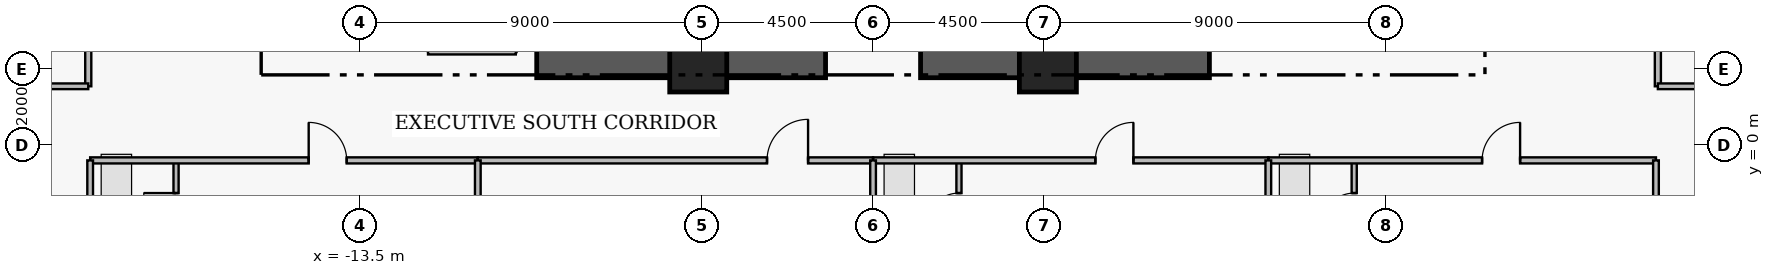
"""IFC4 building model, lengths in metres.
Left out: names, types, materials, properties, quantities, classifications, styles, units other than length and angle.
Written with IfcOpenShell. Run it as: python <this file> out.ifc"""

import sys

from ifc_helpers import new_model, si_unit, direction, frame, frame_2d, origin, origin_2d, place, context, subcontext, project, spatial, rectangle, extrude, element, fill, save


model = new_model("IFC4")
c1 = context("Model", 3, precision=1e-05, world=origin(), true_north=direction((0.0, 1.0)))
c2 = subcontext(c1, "Body", "Model", "MODEL_VIEW")
j1 = project(units=[si_unit("LENGTHUNIT", "METRE"), si_unit("PLANEANGLEUNIT", "RADIAN")], contexts=[c1])
p1 = place(None, origin())
s1 = spatial("IfcSite", under=j1, at=p1, CompositionType="ELEMENT")
p2 = place(p1, origin())
s2 = spatial("IfcBuilding", under=s1, at=p2, CompositionType="ELEMENT")
p3 = place(p2, frame((0.0, 0.0, 132.15)))
s3 = spatial("IfcBuildingStorey", under=s2, at=p3, CompositionType="ELEMENT", Elevation=132.15)
for number, where, z_axis, x_axis in (
    (1, (-8.85, 2.15, 0.0), (0.0, 0.0, 1.0), (1.0, 0.0, 0.0)),
    (2, (1.25, 2.15, 0.0), (0.0, 0.0, 1.0), (1.0, 0.0, 0.0)),
):
    element("IfcWall", number, at=place(p3, frame(where, z_axis=z_axis, x_axis=x_axis)), inside=s3, PredefinedType="SHEAR", context=c2, shape_type="SweptSolid", body=[
        extrude(rectangle(XDim=7.6, YDim=0.75, at=frame_2d((3.8, 0.0))), origin(), (0.0, 0.0, 1.0), 3.43),
    ])
for number, where, z_axis, x_axis in (
    (3, (-4.6, 2.15, 0.0), (0.0, 0.0, 1.0), (1.0, 0.0, 0.0)),
    (4, (4.6, 2.15, 0.0), (0.0, 0.0, 1.0), (1.0, 0.0, 0.0)),
):
    element("IfcColumn", number, at=place(p3, frame(where, z_axis=z_axis, x_axis=x_axis)), inside=s3, PredefinedType="COLUMN", context=c2, shape_type="SweptSolid", body=[
        extrude(rectangle(XDim=1.5, YDim=1.5, at=origin_2d()), origin(), (0.0, 0.0, 1.0), 3.65),
    ])
p4 = place(p3, frame((-18.34, -2.76, 0.0), z_axis=(0.0, 0.0, 1.0), x_axis=(0.0, 1.0, 0.0)))
e5 = element("IfcWall", 5, at=p4, inside=s3, PredefinedType="PLUMBINGWALL", context=c2, shape_type="SweptSolid", body=[
    extrude(rectangle(XDim=2.36, YDim=0.135, at=frame_2d((1.18, 0.0))), origin(), (0.0, 0.0, 1.0), 3.43),
])
p5 = place(p4, frame((0.65, 0.0, 0.0)))
e6 = element("IfcOpeningElement", 6, at=p5, cuts=e5, PredefinedType="OPENING", context=c2, shape_type="SweptSolid", body=[
    extrude(rectangle(XDim=0.85, YDim=2.1, at=frame_2d((0.425, 1.05))), frame((0.0, 0.077, 0.0), z_axis=(0.0, -1.0, 0.0), x_axis=(1.0, 0.0, 0.0)), (0.0, 0.0, 1.0), 0.155),
])
p6 = place(p3, frame((-20.6, -0.4, 0.0), z_axis=(0.0, 0.0, 1.0), x_axis=(1.0, 0.0, 0.0)))
e7 = element("IfcWall", 7, at=p6, inside=s3, PredefinedType="PARTITIONING", context=c2, shape_type="SweptSolid", body=[
    extrude(rectangle(XDim=10.2, YDim=0.16, at=frame_2d((5.1, 0.0))), origin(), (0.0, 0.0, 1.0), 3.43),
])
p7 = place(p6, frame((5.75, 0.0, 0.0)))
e8 = element("IfcOpeningElement", 8, at=p7, cuts=e7, PredefinedType="OPENING", context=c2, shape_type="SweptSolid", body=[
    extrude(rectangle(XDim=1.0, YDim=2.15, at=frame_2d((0.5, 1.075))), frame((0.0, 0.09, 0.0), z_axis=(0.0, -1.0, 0.0), x_axis=(1.0, 0.0, 0.0)), (0.0, 0.0, 1.0), 0.18),
])
p8 = place(p3, frame((-10.4, -0.4, 0.0), z_axis=(0.0, 0.0, 1.0), x_axis=(1.0, 0.0, 0.0)))
e9 = element("IfcWall", 9, at=p8, inside=s3, PredefinedType="PARTITIONING", context=c2, shape_type="SweptSolid", body=[
    extrude(rectangle(XDim=10.4, YDim=0.16, at=frame_2d((5.2, 0.0))), origin(), (0.0, 0.0, 1.0), 3.43),
])
p9 = place(p8, frame((7.61, 0.0, 0.0)))
e10 = element("IfcOpeningElement", 10, at=p9, cuts=e9, PredefinedType="OPENING", context=c2, shape_type="SweptSolid", body=[
    extrude(rectangle(XDim=1.08, YDim=2.18, at=frame_2d((0.54, 1.09))), frame((0.0, 0.09, 0.0), z_axis=(0.0, -1.0, 0.0), x_axis=(1.0, 0.0, 0.0)), (0.0, 0.0, 1.0), 0.18),
])
p10 = place(p3, frame((2.26, -2.76, 0.0), z_axis=(0.0, 0.0, 1.0), x_axis=(0.0, 1.0, 0.0)))
e11 = element("IfcWall", 11, at=p10, inside=s3, PredefinedType="PLUMBINGWALL", context=c2, shape_type="SweptSolid", body=[
    extrude(rectangle(XDim=2.36, YDim=0.135, at=frame_2d((1.18, 0.0))), origin(), (0.0, 0.0, 1.0), 3.43),
])
p11 = place(p10, frame((0.65, 0.0, 0.0)))
e12 = element("IfcOpeningElement", 12, at=p11, cuts=e11, PredefinedType="OPENING", context=c2, shape_type="SweptSolid", body=[
    extrude(rectangle(XDim=0.85, YDim=2.1, at=frame_2d((0.425, 1.05))), frame((0.0, 0.077, 0.0), z_axis=(0.0, -1.0, 0.0), x_axis=(1.0, 0.0, 0.0)), (0.0, 0.0, 1.0), 0.155),
])
p12 = place(p3, frame((0.0, -0.4, 0.0), z_axis=(0.0, 0.0, 1.0), x_axis=(1.0, 0.0, 0.0)))
e13 = element("IfcWall", 13, at=p12, inside=s3, PredefinedType="PARTITIONING", context=c2, shape_type="SweptSolid", body=[
    extrude(rectangle(XDim=10.4, YDim=0.16, at=frame_2d((5.2, 0.0))), origin(), (0.0, 0.0, 1.0), 3.43),
])
p13 = place(p12, frame((5.85, 0.0, 0.0)))
e14 = element("IfcOpeningElement", 14, at=p13, cuts=e13, PredefinedType="OPENING", context=c2, shape_type="SweptSolid", body=[
    extrude(rectangle(XDim=1.0, YDim=2.15, at=frame_2d((0.5, 1.075))), frame((0.0, 0.09, 0.0), z_axis=(0.0, -1.0, 0.0), x_axis=(1.0, 0.0, 0.0)), (0.0, 0.0, 1.0), 0.18),
])
p14 = place(p3, frame((12.66, -2.76, 0.0), z_axis=(0.0, 0.0, 1.0), x_axis=(0.0, 1.0, 0.0)))
e15 = element("IfcWall", 15, at=p14, inside=s3, PredefinedType="PLUMBINGWALL", context=c2, shape_type="SweptSolid", body=[
    extrude(rectangle(XDim=2.36, YDim=0.135, at=frame_2d((1.18, 0.0))), origin(), (0.0, 0.0, 1.0), 3.43),
])
p15 = place(p14, frame((0.65, 0.0, 0.0)))
e16 = element("IfcOpeningElement", 16, at=p15, cuts=e15, PredefinedType="OPENING", context=c2, shape_type="SweptSolid", body=[
    extrude(rectangle(XDim=0.85, YDim=2.1, at=frame_2d((0.425, 1.05))), frame((0.0, 0.077, 0.0), z_axis=(0.0, -1.0, 0.0), x_axis=(1.0, 0.0, 0.0)), (0.0, 0.0, 1.0), 0.155),
])
p16 = place(p3, frame((10.4, -0.4, 0.0), z_axis=(0.0, 0.0, 1.0), x_axis=(1.0, 0.0, 0.0)))
e17 = element("IfcWall", 17, at=p16, inside=s3, PredefinedType="PARTITIONING", context=c2, shape_type="SweptSolid", body=[
    extrude(rectangle(XDim=10.2, YDim=0.16, at=frame_2d((5.1, 0.0))), origin(), (0.0, 0.0, 1.0), 3.43),
])
p17 = place(p16, frame((5.625, 0.0, 0.0)))
e18 = element("IfcOpeningElement", 18, at=p17, cuts=e17, PredefinedType="OPENING", context=c2, shape_type="SweptSolid", body=[
    extrude(rectangle(XDim=1.0, YDim=2.15, at=frame_2d((0.5, 1.075))), frame((0.0, 0.09, 0.0), z_axis=(0.0, -1.0, 0.0), x_axis=(1.0, 0.0, 0.0)), (0.0, 0.0, 1.0), 0.18),
])
p18 = place(p3, frame((20.65, 1.55, 0.0), z_axis=(0.0, 0.0, 1.0), x_axis=(0.0, 1.0, 0.0)))
e19 = element("IfcWall", 19, at=p18, inside=s3, PredefinedType="PARTITIONING", context=c2, shape_type="SweptSolid", body=[
    extrude(rectangle(XDim=6.25, YDim=0.16, at=frame_2d((3.125, 0.0))), origin(), (0.0, 0.0, 1.0), 3.43),
])
p19 = place(p18, frame((2.665, 0.0, 0.0)))
e20 = element("IfcOpeningElement", 20, at=p19, cuts=e19, PredefinedType="OPENING", context=c2, shape_type="SweptSolid", body=[
    extrude(rectangle(XDim=0.92, YDim=2.12, at=frame_2d((0.46, 1.06))), frame((0.0, 0.09, 0.0), z_axis=(0.0, -1.0, 0.0), x_axis=(1.0, 0.0, 0.0)), (0.0, 0.0, 1.0), 0.18),
])
p20 = place(p3, frame((-20.65, 1.55, 0.0), z_axis=(0.0, 0.0, 1.0), x_axis=(0.0, 1.0, 0.0)))
e21 = element("IfcWall", 21, at=p20, inside=s3, PredefinedType="PARTITIONING", context=c2, shape_type="SweptSolid", body=[
    extrude(rectangle(XDim=13.3, YDim=0.16, at=frame_2d((6.65, 0.0))), origin(), (0.0, 0.0, 1.0), 3.43),
])
p21 = place(p20, frame((6.175, 0.0, 0.0)))
e22 = element("IfcOpeningElement", 22, at=p21, cuts=e21, PredefinedType="OPENING", context=c2, shape_type="SweptSolid", body=[
    extrude(rectangle(XDim=0.95, YDim=2.15, at=frame_2d((0.475, 1.075))), frame((0.0, 0.09, 0.0), z_axis=(0.0, -1.0, 0.0), x_axis=(1.0, 0.0, 0.0)), (0.0, 0.0, 1.0), 0.18),
])
p22 = place(p3, frame((-11.71, 2.47, 0.0), z_axis=(0.0, 0.0, 1.0), x_axis=(1.0, 0.0, 0.0)))
e23 = element("IfcWall", 23, at=p22, inside=s3, PredefinedType="PARTITIONING", context=c2, shape_type="SweptSolid", body=[
    extrude(rectangle(XDim=2.31, YDim=0.165, at=frame_2d((1.155, 0.0))), origin(), (0.0, 0.0, 1.0), 2.03),
])
p23 = place(p3, frame((-20.6, -11.9, 0.0), z_axis=(0.0, 0.0, 1.0), x_axis=(0.0, 1.0, 0.0)))
e24 = element("IfcWall", 24, at=p23, inside=s3, PredefinedType="PARTITIONING", context=c2, shape_type="SweptSolid", body=[
    extrude(rectangle(XDim=11.5, YDim=0.15, at=frame_2d((5.75, 0.0))), origin(), (0.0, 0.0, 1.0), 3.43),
])
p24 = place(p3, frame((-10.4, -15.32, 0.0), z_axis=(0.0, 0.0, 1.0), x_axis=(0.0, 1.0, 0.0)))
e25 = element("IfcWall", 25, at=p24, inside=s3, PredefinedType="PARTITIONING", context=c2, shape_type="SweptSolid", body=[
    extrude(rectangle(XDim=14.92, YDim=0.15, at=frame_2d((7.46, 0.0))), origin(), (0.0, 0.0, 1.0), 3.43),
])
p25 = place(p3, frame((0.0, -15.34, 0.0), z_axis=(0.0, 0.0, 1.0), x_axis=(0.0, 1.0, 0.0)))
e26 = element("IfcWall", 26, at=p25, inside=s3, PredefinedType="PARTITIONING", context=c2, shape_type="SweptSolid", body=[
    extrude(rectangle(XDim=14.94, YDim=0.15, at=frame_2d((7.47, 0.0))), origin(), (0.0, 0.0, 1.0), 3.43),
])
p26 = place(p3, frame((10.4, -15.32, 0.0), z_axis=(0.0, 0.0, 1.0), x_axis=(0.0, 1.0, 0.0)))
e27 = element("IfcWall", 27, at=p26, inside=s3, PredefinedType="PARTITIONING", context=c2, shape_type="SweptSolid", body=[
    extrude(rectangle(XDim=14.92, YDim=0.15, at=frame_2d((7.46, 0.0))), origin(), (0.0, 0.0, 1.0), 3.43),
])
p27 = place(p3, frame((20.6, -11.9, 0.0), z_axis=(0.0, 0.0, 1.0), x_axis=(0.0, 1.0, 0.0)))
e28 = element("IfcWall", 28, at=p27, inside=s3, PredefinedType="PARTITIONING", context=c2, shape_type="SweptSolid", body=[
    extrude(rectangle(XDim=11.5, YDim=0.15, at=frame_2d((5.75, 0.0))), origin(), (0.0, 0.0, 1.0), 3.43),
])
for number, where, z_axis, x_axis in (
    (29, (20.65, 1.55, 0.0), (0.0, 0.0, 1.0), (1.0, 0.0, 0.0)),
    (30, (-23.867, 1.55, 0.0), (0.0, 0.0, 1.0), (1.0, 0.0, 0.0)),
):
    element("IfcWall", number, at=place(p3, frame(where, z_axis=z_axis, x_axis=x_axis)), inside=s3, PredefinedType="PARTITIONING", context=c2, shape_type="SweptSolid", body=[
        extrude(rectangle(XDim=3.217, YDim=0.15, at=frame_2d((1.608, 0.0))), origin(), (0.0, 0.0, 1.0), 3.43),
    ])
p28 = place(p5, origin())
e31 = element("IfcDoor", 31, at=p28, inside=s3, OperationType="SINGLE_SWING_RIGHT", PredefinedType="DOOR", context=c2, shape_type="SweptSolid", body=[
    extrude(rectangle(XDim=0.85, YDim=2.1, at=frame_2d((0.425, 1.05))), frame((0.0, 0.025, 0.0), z_axis=(0.0, -1.0, 0.0), x_axis=(1.0, 0.0, 0.0)), (0.0, 0.0, 1.0), 0.05),
])
fill(e6, e31)
p29 = place(p7, origin())
e32 = element("IfcDoor", 32, at=p29, inside=s3, OperationType="SINGLE_SWING_LEFT", PredefinedType="DOOR", context=c2, shape_type="SweptSolid", body=[
    extrude(rectangle(XDim=1.0, YDim=2.15, at=frame_2d((0.5, 1.075))), frame((0.0, 0.025, 0.0), z_axis=(0.0, -1.0, 0.0), x_axis=(1.0, 0.0, 0.0)), (0.0, 0.0, 1.0), 0.05),
])
fill(e8, e32)
p30 = place(p9, origin())
e33 = element("IfcDoor", 33, at=p30, inside=s3, OperationType="SINGLE_SWING_RIGHT", PredefinedType="DOOR", context=c2, shape_type="SweptSolid", body=[
    extrude(rectangle(XDim=1.08, YDim=2.18, at=frame_2d((0.54, 1.09))), frame((0.0, 0.025, 0.0), z_axis=(0.0, -1.0, 0.0), x_axis=(1.0, 0.0, 0.0)), (0.0, 0.0, 1.0), 0.05),
])
fill(e10, e33)
p31 = place(p11, origin())
e34 = element("IfcDoor", 34, at=p31, inside=s3, OperationType="SINGLE_SWING_LEFT", PredefinedType="DOOR", context=c2, shape_type="SweptSolid", body=[
    extrude(rectangle(XDim=0.85, YDim=2.1, at=frame_2d((0.425, 1.05))), frame((0.0, 0.025, 0.0), z_axis=(0.0, -1.0, 0.0), x_axis=(1.0, 0.0, 0.0)), (0.0, 0.0, 1.0), 0.05),
])
fill(e12, e34)
p32 = place(p13, origin())
e35 = element("IfcDoor", 35, at=p32, inside=s3, OperationType="SINGLE_SWING_RIGHT", PredefinedType="DOOR", context=c2, shape_type="SweptSolid", body=[
    extrude(rectangle(XDim=1.0, YDim=2.15, at=frame_2d((0.5, 1.075))), frame((0.0, 0.025, 0.0), z_axis=(0.0, -1.0, 0.0), x_axis=(1.0, 0.0, 0.0)), (0.0, 0.0, 1.0), 0.05),
])
fill(e14, e35)
p33 = place(p15, origin())
e36 = element("IfcDoor", 36, at=p33, inside=s3, OperationType="SINGLE_SWING_LEFT", PredefinedType="DOOR", context=c2, shape_type="SweptSolid", body=[
    extrude(rectangle(XDim=0.85, YDim=2.1, at=frame_2d((0.425, 1.05))), frame((0.0, 0.025, 0.0), z_axis=(0.0, -1.0, 0.0), x_axis=(1.0, 0.0, 0.0)), (0.0, 0.0, 1.0), 0.05),
])
fill(e16, e36)
p34 = place(p17, origin())
e37 = element("IfcDoor", 37, at=p34, inside=s3, OperationType="SINGLE_SWING_RIGHT", PredefinedType="DOOR", context=c2, shape_type="SweptSolid", body=[
    extrude(rectangle(XDim=1.0, YDim=2.15, at=frame_2d((0.5, 1.075))), frame((0.0, 0.025, 0.0), z_axis=(0.0, -1.0, 0.0), x_axis=(1.0, 0.0, 0.0)), (0.0, 0.0, 1.0), 0.05),
])
fill(e18, e37)
save(model, sys.argv[1])
